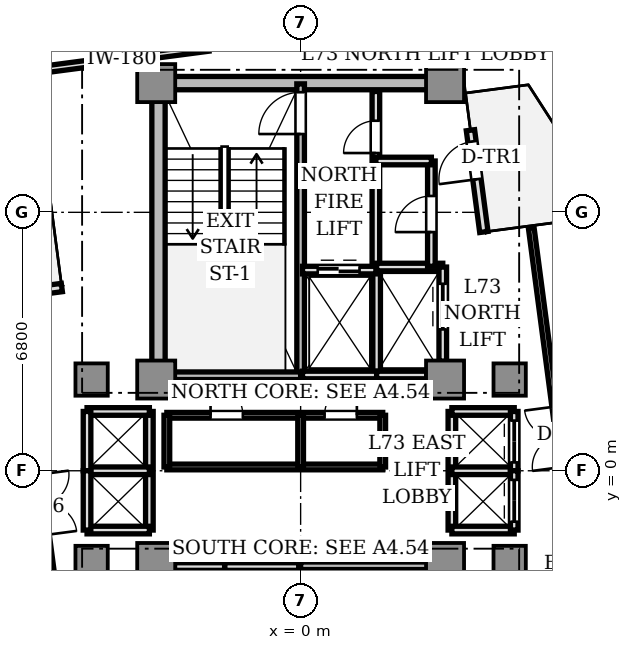
"""IFC4 building model, lengths in metres.
Left out: names, types, materials, properties, quantities, classifications, styles, units other than length and angle.
Written with IfcOpenShell. Run it as: python <this file> out.ifc"""

import sys

from ifc_helpers import new_model, si_unit, direction, frame, frame_2d, origin, origin_2d, place, context, subcontext, project, spatial, rectangle, extrude, source, transform, mapped, element, fill, save


model = new_model("IFC4")
c1 = context("Model", 3, precision=1e-05, world=origin(), true_north=direction((0.0, 1.0)))
c2 = subcontext(c1, "Body", "Model", "MODEL_VIEW")
j1 = project(units=[si_unit("LENGTHUNIT", "METRE"), si_unit("PLANEANGLEUNIT", "RADIAN")], contexts=[c1])
p1 = place(None, origin())
s1 = spatial("IfcSite", under=j1, at=p1, CompositionType="ELEMENT")
p2 = place(p1, origin())
s2 = spatial("IfcBuilding", under=s1, at=p2, CompositionType="ELEMENT")
p3 = place(p2, frame((0.0, 0.0, 261.25)))
s3 = spatial("IfcBuildingStorey", under=s2, at=p3, CompositionType="ELEMENT", Elevation=261.25)
p4 = place(p3, frame((-3.55, 10.2, 0.0), z_axis=(0.0, 0.0, 1.0), x_axis=(1.0, 0.0, 0.0)))
e1 = element("IfcWall", 1, at=p4, inside=s3, PredefinedType="SHEAR", context=c2, shape_type="SweptSolid", body=[
    extrude(rectangle(XDim=7.1, YDim=0.35, at=frame_2d((3.55, 0.0))), origin(), (0.0, 0.0, 1.0), 3.03),
])
p5 = place(p3, frame((-3.74, 2.85, 0.0), z_axis=(0.0, 0.0, 1.0), x_axis=(0.0, 1.0, 0.0)))
e2 = element("IfcWall", 2, at=p5, inside=s3, PredefinedType="SHEAR", context=c2, shape_type="SweptSolid", body=[
    extrude(rectangle(XDim=6.9, YDim=0.35, at=frame_2d((3.45, 0.0))), origin(), (0.0, 0.0, 1.0), 3.03),
])
m1 = source(origin(), c2, "Body", "SweptSolid", [
    extrude(rectangle(XDim=1.0, YDim=1.0, at=origin_2d()), origin(), (0.0, 0.0, 1.0), 3.03),
])
for number, where, z_axis, x_axis in (
    (3, (-3.8, 2.4, 0.0), (0.0, 0.0, 1.0), (1.0, 0.0, 0.0)),
    (4, (3.8, 2.4, 0.0), (0.0, 0.0, 1.0), (1.0, 0.0, 0.0)),
    (5, (-3.8, 10.2, 0.0), (0.0, 0.0, 1.0), (1.0, 0.0, 0.0)),
    (6, (3.8, 10.2, 0.0), (0.0, 0.0, 1.0), (1.0, 0.0, 0.0)),
    (7, (-3.8, -2.4, 0.0), (0.0, 0.0, 1.0), (1.0, 0.0, 0.0)),
    (8, (3.8, -2.4, 0.0), (0.0, 0.0, 1.0), (1.0, 0.0, 0.0)),
):
    element("IfcColumn", number, at=place(p3, frame(where, z_axis=z_axis, x_axis=x_axis)), inside=s3, PredefinedType="COLUMN", context=c2, shape_type="MappedRepresentation", body=[
        mapped(m1, transform((0.0, 0.0, 0.0), scale=1.0)),
    ])
m2 = source(origin(), c2, "Body", "SweptSolid", [
    extrude(rectangle(XDim=0.85, YDim=0.85, at=origin_2d()), origin(), (0.0, 0.0, 1.0), 3.03),
])
for number, where, z_axis, x_axis in (
    (9, (5.5, 2.4, 0.0), (0.0, 0.0, 1.0), (1.0, 0.0, 0.0)),
    (10, (-5.5, 2.4, 0.0), (0.0, 0.0, 1.0), (1.0, 0.0, 0.0)),
    (11, (5.5, -2.4, 0.0), (0.0, 0.0, 1.0), (1.0, 0.0, 0.0)),
    (12, (-5.5, -2.4, 0.0), (0.0, 0.0, 1.0), (1.0, 0.0, 0.0)),
):
    element("IfcColumn", number, at=place(p3, frame(where, z_axis=z_axis, x_axis=x_axis)), inside=s3, PredefinedType="COLUMN", context=c2, shape_type="MappedRepresentation", body=[
        mapped(m2, transform((0.0, 0.0, 0.0), scale=1.0)),
    ])
p6 = place(p3, frame((4.821, 6.283, 0.0), z_axis=(0.0, 0.0, 1.0), x_axis=(-0.130475563272, 0.991451525486, 0.0)))
e13 = element("IfcWall", 13, at=p6, inside=s3, PredefinedType="STANDARD", context=c2, shape_type="SweptSolid", body=[
    extrude(rectangle(XDim=2.7, YDim=0.22, at=frame_2d((1.35, 0.0))), origin(), (0.0, 0.0, 1.0), 3.03),
])
p7 = place(p6, frame((1.4, 0.0, 0.0)))
e14 = element("IfcOpeningElement", 14, at=p7, cuts=e13, PredefinedType="OPENING", context=c2, shape_type="SweptSolid", body=[
    extrude(rectangle(XDim=1.0, YDim=2.2, at=frame_2d((0.5, 1.1))), frame((0.0, 0.12, 0.0), z_axis=(0.0, -1.0, 0.0), x_axis=(1.0, 0.0, 0.0)), (0.0, 0.0, 1.0), 0.24),
])
p8 = place(p3, frame((-6.283, 4.821, 0.0), z_axis=(0.0, 0.0, 1.0), x_axis=(-0.991451525486, -0.130475563272, 0.0)))
e15 = element("IfcWall", 15, at=p8, inside=s3, PredefinedType="STANDARD", context=c2, shape_type="SweptSolid", body=[
    extrude(rectangle(XDim=2.7, YDim=0.22, at=frame_2d((1.35, 0.0))), origin(), (0.0, 0.0, 1.0), 3.03),
])
p9 = place(p8, frame((1.4, 0.0, 0.0)))
e16 = element("IfcOpeningElement", 16, at=p9, cuts=e15, PredefinedType="OPENING", context=c2, shape_type="SweptSolid", body=[
    extrude(rectangle(XDim=1.0, YDim=2.2, at=frame_2d((0.5, 1.1))), frame((0.0, 0.12, 0.0), z_axis=(0.0, -1.0, 0.0), x_axis=(1.0, 0.0, 0.0)), (0.0, 0.0, 1.0), 0.24),
])
p10 = place(p3, frame((0.0, 2.5, 0.0), z_axis=(0.0, 0.0, 1.0), x_axis=(0.0, 1.0, 0.0)))
e17 = element("IfcWall", 17, at=p10, inside=s3, PredefinedType="SOLIDWALL", context=c2, shape_type="SweptSolid", body=[
    extrude(rectangle(XDim=7.68, YDim=0.2, at=frame_2d((3.84, 0.0))), origin(), (0.0, 0.0, 1.0), 3.03),
])
p11 = place(p10, frame((6.36, 0.0, 0.0)))
e18 = element("IfcOpeningElement", 18, at=p11, cuts=e17, PredefinedType="OPENING", context=c2, shape_type="SweptSolid", body=[
    extrude(rectangle(XDim=1.1, YDim=2.15, at=frame_2d((0.55, 1.075))), frame((0.0, 0.11, 0.0), z_axis=(0.0, -1.0, 0.0), x_axis=(1.0, 0.0, 0.0)), (0.0, 0.0, 1.0), 0.22),
])
p12 = place(p3, frame((-3.72, 2.5, 0.0), z_axis=(0.0, 0.0, 1.0), x_axis=(1.0, 0.0, 0.0)))
e19 = element("IfcWall", 19, at=p12, inside=s3, PredefinedType="SOLIDWALL", context=c2, shape_type="SweptSolid", body=[
    extrude(rectangle(XDim=3.72, YDim=0.2, at=frame_2d((1.86, 0.0))), origin(), (0.0, 0.0, 1.0), 3.03),
])
p13 = place(p3, frame((0.0, -10.18, 0.0), z_axis=(0.0, 0.0, 1.0), x_axis=(0.0, 1.0, 0.0)))
e20 = element("IfcWall", 20, at=p13, inside=s3, PredefinedType="SOLIDWALL", context=c2, shape_type="SweptSolid", body=[
    extrude(rectangle(XDim=7.68, YDim=0.2, at=frame_2d((3.84, 0.0))), origin(), (0.0, 0.0, 1.0), 3.03),
])
p14 = place(p13, frame((0.28, 0.0, 0.0)))
e21 = element("IfcOpeningElement", 21, at=p14, cuts=e20, PredefinedType="OPENING", context=c2, shape_type="SweptSolid", body=[
    extrude(rectangle(XDim=1.1, YDim=2.15, at=frame_2d((0.55, 1.075))), frame((0.0, 0.11, 0.0), z_axis=(0.0, -1.0, 0.0), x_axis=(1.0, 0.0, 0.0)), (0.0, 0.0, 1.0), 0.22),
])
p15 = place(p3, frame((0.0, -2.5, 0.0), z_axis=(0.0, 0.0, 1.0), x_axis=(1.0, 0.0, 0.0)))
e22 = element("IfcWall", 22, at=p15, inside=s3, PredefinedType="SOLIDWALL", context=c2, shape_type="SweptSolid", body=[
    extrude(rectangle(XDim=3.72, YDim=0.2, at=frame_2d((1.86, 0.0))), origin(), (0.0, 0.0, 1.0), 3.03),
])
p16 = place(p3, frame((1.98, 5.32, 0.0), z_axis=(0.0, 0.0, 1.0), x_axis=(0.0, 1.0, 0.0)))
e23 = element("IfcWall", 23, at=p16, inside=s3, PredefinedType="SOLIDWALL", context=c2, shape_type="SweptSolid", body=[
    extrude(rectangle(XDim=4.66, YDim=0.2, at=frame_2d((2.33, 0.0))), origin(), (0.0, 0.0, 1.0), 2.58),
])
p17 = place(p16, frame((3.04, 0.0, 0.0)))
e24 = element("IfcOpeningElement", 24, at=p17, cuts=e23, PredefinedType="OPENING", context=c2, shape_type="SweptSolid", body=[
    extrude(rectangle(XDim=0.85, YDim=2.1, at=frame_2d((0.425, 1.05))), frame((0.0, 0.11, 0.0), z_axis=(0.0, -1.0, 0.0), x_axis=(1.0, 0.0, 0.0)), (0.0, 0.0, 1.0), 0.22),
])
p18 = place(p3, frame((2.0, 2.5, 0.0), z_axis=(0.0, 0.0, 1.0), x_axis=(0.0, 1.0, 0.0)))
e25 = element("IfcWall", 25, at=p18, inside=s3, PredefinedType="SOLIDWALL", context=c2, shape_type="SweptSolid", body=[
    extrude(rectangle(XDim=2.78, YDim=0.2, at=frame_2d((1.39, 0.0))), origin(), (0.0, 0.0, 1.0), 2.58),
])
p19 = place(p3, frame((0.05, 2.52, 0.0), z_axis=(0.0, 0.0, 1.0), x_axis=(1.0, 0.0, 0.0)))
e26 = element("IfcWall", 26, at=p19, inside=s3, PredefinedType="SOLIDWALL", context=c2, shape_type="SweptSolid", body=[
    extrude(rectangle(XDim=1.95, YDim=0.2, at=frame_2d((0.975, 0.0))), origin(), (0.0, 0.0, 1.0), 2.58),
])
p20 = place(p3, frame((0.05, 5.28, 0.0), z_axis=(0.0, 0.0, 1.0), x_axis=(1.0, 0.0, 0.0)))
e27 = element("IfcWall", 27, at=p20, inside=s3, PredefinedType="SOLIDWALL", context=c2, shape_type="SweptSolid", body=[
    extrude(rectangle(XDim=1.93, YDim=0.2, at=frame_2d((0.965, 0.0))), origin(), (0.0, 0.0, 1.0), 2.58),
])
p21 = place(p20, frame((0.4, 0.0, 0.0)))
e28 = element("IfcOpeningElement", 28, at=p21, cuts=e27, PredefinedType="OPENING", context=c2, shape_type="SweptSolid", body=[
    extrude(rectangle(XDim=1.1, YDim=2.2, at=frame_2d((0.55, 1.1))), frame((0.0, 0.11, 0.0), z_axis=(0.0, -1.0, 0.0), x_axis=(1.0, 0.0, 0.0)), (0.0, 0.0, 1.0), 0.22),
])
p22 = place(p3, frame((-2.0, -5.28, 0.0), z_axis=(0.0, 0.0, 1.0), x_axis=(0.0, 1.0, 0.0)))
e29 = element("IfcWall", 29, at=p22, inside=s3, PredefinedType="SOLIDWALL", context=c2, shape_type="SweptSolid", body=[
    extrude(rectangle(XDim=2.78, YDim=0.2, at=frame_2d((1.39, 0.0))), origin(), (0.0, 0.0, 1.0), 2.58),
])
p23 = place(p3, frame((-2.0, -2.52, 0.0), z_axis=(0.0, 0.0, 1.0), x_axis=(1.0, 0.0, 0.0)))
e30 = element("IfcWall", 30, at=p23, inside=s3, PredefinedType="SOLIDWALL", context=c2, shape_type="SweptSolid", body=[
    extrude(rectangle(XDim=1.95, YDim=0.2, at=frame_2d((0.975, 0.0))), origin(), (0.0, 0.0, 1.0), 2.58),
])
p24 = place(p3, frame((2.0, 2.52, 0.0), z_axis=(0.0, 0.0, 1.0), x_axis=(1.0, 0.0, 0.0)))
e31 = element("IfcWall", 31, at=p24, inside=s3, PredefinedType="SOLIDWALL", context=c2, shape_type="SweptSolid", body=[
    extrude(rectangle(XDim=1.32, YDim=0.2, at=frame_2d((0.66, 0.0))), origin(), (0.0, 0.0, 1.0), 2.58),
])
p25 = place(p3, frame((2.0, 5.36, 0.0), z_axis=(0.0, 0.0, 1.0), x_axis=(1.0, 0.0, 0.0)))
e32 = element("IfcWall", 32, at=p25, inside=s3, PredefinedType="SOLIDWALL", context=c2, shape_type="SweptSolid", body=[
    extrude(rectangle(XDim=1.74, YDim=0.2, at=frame_2d((0.87, 0.0))), origin(), (0.0, 0.0, 1.0), 2.58),
])
p26 = place(p3, frame((3.74, 2.88, 0.0), z_axis=(0.0, 0.0, 1.0), x_axis=(0.0, 1.0, 0.0)))
e33 = element("IfcWall", 33, at=p26, inside=s3, PredefinedType="SOLIDWALL", context=c2, shape_type="SweptSolid", body=[
    extrude(rectangle(XDim=2.48, YDim=0.2, at=frame_2d((1.24, 0.0))), origin(), (0.0, 0.0, 1.0), 2.58),
])
p27 = place(p26, frame((0.84, 0.0, 0.0)))
e34 = element("IfcOpeningElement", 34, at=p27, cuts=e33, PredefinedType="OPENING", context=c2, shape_type="SweptSolid", body=[
    extrude(rectangle(XDim=1.2, YDim=2.2, at=frame_2d((0.6, 1.1))), frame((0.0, 0.11, 0.0), z_axis=(0.0, -1.0, 0.0), x_axis=(1.0, 0.0, 0.0)), (0.0, 0.0, 1.0), 0.22),
])
p28 = place(p3, frame((-3.32, -2.52, 0.0), z_axis=(0.0, 0.0, 1.0), x_axis=(1.0, 0.0, 0.0)))
e35 = element("IfcWall", 35, at=p28, inside=s3, PredefinedType="SOLIDWALL", context=c2, shape_type="SweptSolid", body=[
    extrude(rectangle(XDim=1.32, YDim=0.2, at=frame_2d((0.66, 0.0))), origin(), (0.0, 0.0, 1.0), 2.58),
])
p29 = place(p3, frame((3.98, -1.56, 0.0), z_axis=(0.0, 0.0, 1.0), x_axis=(0.0, 1.0, 0.0)))
e36 = element("IfcWall", 36, at=p29, inside=s3, PredefinedType="SOLIDWALL", context=c2, shape_type="SweptSolid", body=[
    extrude(rectangle(XDim=3.12, YDim=0.2, at=frame_2d((1.56, 0.0))), origin(), (0.0, 0.0, 1.0), 2.25),
])
for number, where, z_axis, x_axis in (
    (37, (3.98, 1.56, 0.0), (0.0, 0.0, 1.0), (1.0, 0.0, 0.0)),
    (38, (3.98, -1.56, 0.0), (0.0, 0.0, 1.0), (1.0, 0.0, 0.0)),
    (39, (3.98, 0.0, 0.0), (0.0, 0.0, 1.0), (1.0, 0.0, 0.0)),
):
    element("IfcWall", number, at=place(p3, frame(where, z_axis=z_axis, x_axis=x_axis)), inside=s3, PredefinedType="SOLIDWALL", context=c2, shape_type="SweptSolid", body=[
        extrude(rectangle(XDim=1.64, YDim=0.2, at=frame_2d((0.82, 0.0))), origin(), (0.0, 0.0, 1.0), 2.58),
    ])
p30 = place(p3, frame((5.62, 0.0, 0.0), z_axis=(0.0, 0.0, 1.0), x_axis=(0.0, 1.0, 0.0)))
e40 = element("IfcWall", 40, at=p30, inside=s3, PredefinedType="SOLIDWALL", context=c2, shape_type="SweptSolid", body=[
    extrude(rectangle(XDim=1.56, YDim=0.2, at=frame_2d((0.78, 0.0))), origin(), (0.0, 0.0, 1.0), 2.58),
])
p31 = place(p30, frame((0.22, 0.0, 0.0)))
e41 = element("IfcOpeningElement", 41, at=p31, cuts=e40, PredefinedType="OPENING", context=c2, shape_type="SweptSolid", body=[
    extrude(rectangle(XDim=1.1, YDim=2.2, at=frame_2d((0.55, 1.1))), frame((0.0, 0.11, 0.0), z_axis=(0.0, -1.0, 0.0), x_axis=(1.0, 0.0, 0.0)), (0.0, 0.0, 1.0), 0.22),
])
p32 = place(p3, frame((5.62, -1.56, 0.0), z_axis=(0.0, 0.0, 1.0), x_axis=(0.0, 1.0, 0.0)))
e42 = element("IfcWall", 42, at=p32, inside=s3, PredefinedType="SOLIDWALL", context=c2, shape_type="SweptSolid", body=[
    extrude(rectangle(XDim=1.56, YDim=0.2, at=frame_2d((0.78, 0.0))), origin(), (0.0, 0.0, 1.0), 2.58),
])
p33 = place(p32, frame((0.22, 0.0, 0.0)))
e43 = element("IfcOpeningElement", 43, at=p33, cuts=e42, PredefinedType="OPENING", context=c2, shape_type="SweptSolid", body=[
    extrude(rectangle(XDim=1.1, YDim=2.2, at=frame_2d((0.55, 1.1))), frame((0.0, 0.11, 0.0), z_axis=(0.0, -1.0, 0.0), x_axis=(1.0, 0.0, 0.0)), (0.0, 0.0, 1.0), 0.22),
])
p34 = place(p3, frame((-3.98, -1.56, 0.0), z_axis=(0.0, 0.0, 1.0), x_axis=(0.0, 1.0, 0.0)))
e44 = element("IfcWall", 44, at=p34, inside=s3, PredefinedType="SOLIDWALL", context=c2, shape_type="SweptSolid", body=[
    extrude(rectangle(XDim=3.12, YDim=0.2, at=frame_2d((1.56, 0.0))), origin(), (0.0, 0.0, 1.0), 2.25),
])
for number, where, z_axis, x_axis in (
    (45, (-5.62, 1.56, 0.0), (0.0, 0.0, 1.0), (1.0, 0.0, 0.0)),
    (46, (-5.62, -1.56, 0.0), (0.0, 0.0, 1.0), (1.0, 0.0, 0.0)),
    (47, (-5.62, 0.0, 0.0), (0.0, 0.0, 1.0), (1.0, 0.0, 0.0)),
):
    element("IfcWall", number, at=place(p3, frame(where, z_axis=z_axis, x_axis=x_axis)), inside=s3, PredefinedType="SOLIDWALL", context=c2, shape_type="SweptSolid", body=[
        extrude(rectangle(XDim=1.64, YDim=0.2, at=frame_2d((0.82, 0.0))), origin(), (0.0, 0.0, 1.0), 2.58),
    ])
for number, where, z_axis, x_axis in (
    (48, (-5.62, 0.0, 0.0), (0.0, 0.0, 1.0), (0.0, 1.0, 0.0)),
    (49, (-5.62, -1.56, 0.0), (0.0, 0.0, 1.0), (0.0, 1.0, 0.0)),
):
    element("IfcWall", number, at=place(p3, frame(where, z_axis=z_axis, x_axis=x_axis)), inside=s3, PredefinedType="SOLIDWALL", context=c2, shape_type="SweptSolid", body=[
        extrude(rectangle(XDim=1.56, YDim=0.2, at=frame_2d((0.78, 0.0))), origin(), (0.0, 0.0, 1.0), 2.58),
    ])
p35 = place(p3, frame((3.44, 5.38, 0.0), z_axis=(0.0, 0.0, 1.0), x_axis=(0.0, 1.0, 0.0)))
e50 = element("IfcWall", 50, at=p35, inside=s3, PredefinedType="SOLIDWALL", context=c2, shape_type="SweptSolid", body=[
    extrude(rectangle(XDim=2.77, YDim=0.2, at=frame_2d((1.385, 0.0))), origin(), (0.0, 0.0, 1.0), 2.58),
])
p36 = place(p35, frame((0.9, 0.0, 0.0)))
e51 = element("IfcOpeningElement", 51, at=p36, cuts=e50, PredefinedType="OPENING", context=c2, shape_type="SweptSolid", body=[
    extrude(rectangle(XDim=0.95, YDim=2.15, at=frame_2d((0.475, 1.075))), frame((0.0, 0.11, 0.0), z_axis=(0.0, -1.0, 0.0), x_axis=(1.0, 0.0, 0.0)), (0.0, 0.0, 1.0), 0.22),
])
p37 = place(p3, frame((1.98, 8.15, 0.0), z_axis=(0.0, 0.0, 1.0), x_axis=(1.0, 0.0, 0.0)))
e52 = element("IfcWall", 52, at=p37, inside=s3, PredefinedType="SOLIDWALL", context=c2, shape_type="SweptSolid", body=[
    extrude(rectangle(XDim=1.46, YDim=0.2, at=frame_2d((0.73, 0.0))), origin(), (0.0, 0.0, 1.0), 2.58),
])
p38 = place(p3, frame((-3.52, 0.1, 0.0), z_axis=(0.0, 0.0, 1.0), x_axis=(1.0, 0.0, 0.0)))
e53 = element("IfcWall", 53, at=p38, inside=s3, PredefinedType="PARTITIONING", context=c2, shape_type="SweptSolid", body=[
    extrude(rectangle(XDim=5.68, YDim=0.15, at=frame_2d((2.84, 0.0))), origin(), (0.0, 0.0, 1.0), 2.58),
])
p39 = place(p3, frame((-3.52, 1.46, 0.0), z_axis=(0.0, 0.0, 1.0), x_axis=(1.0, 0.0, 0.0)))
e54 = element("IfcWall", 54, at=p39, inside=s3, PredefinedType="PARTITIONING", context=c2, shape_type="SweptSolid", body=[
    extrude(rectangle(XDim=5.68, YDim=0.15, at=frame_2d((2.84, 0.0))), origin(), (0.0, 0.0, 1.0), 2.58),
])
p40 = place(p39, frame((1.15, 0.0, 0.0)))
e55 = element("IfcOpeningElement", 55, at=p40, cuts=e54, PredefinedType="OPENING", context=c2, shape_type="SweptSolid", body=[
    extrude(rectangle(XDim=0.85, YDim=2.1, at=frame_2d((0.425, 1.05))), frame((0.0, 0.085, 0.0), z_axis=(0.0, -1.0, 0.0), x_axis=(1.0, 0.0, 0.0)), (0.0, 0.0, 1.0), 0.17),
])
p41 = place(p39, frame((4.15, 0.0, 0.0)))
e56 = element("IfcOpeningElement", 56, at=p41, cuts=e54, PredefinedType="OPENING", context=c2, shape_type="SweptSolid", body=[
    extrude(rectangle(XDim=0.85, YDim=2.1, at=frame_2d((0.425, 1.05))), frame((0.0, 0.085, 0.0), z_axis=(0.0, -1.0, 0.0), x_axis=(1.0, 0.0, 0.0)), (0.0, 0.0, 1.0), 0.17),
])
p42 = place(p3, frame((-3.52, 0.1, 0.0), z_axis=(0.0, 0.0, 1.0), x_axis=(0.0, 1.0, 0.0)))
e57 = element("IfcWall", 57, at=p42, inside=s3, PredefinedType="PARTITIONING", context=c2, shape_type="SweptSolid", body=[
    extrude(rectangle(XDim=1.36, YDim=0.15, at=frame_2d((0.68, 0.0))), origin(), (0.0, 0.0, 1.0), 2.25),
])
for number, where, z_axis, x_axis in (
    (58, (2.16, 0.1, 0.0), (0.0, 0.0, 1.0), (0.0, 1.0, 0.0)),
    (59, (0.0, 0.1, 0.0), (0.0, 0.0, 1.0), (0.0, 1.0, 0.0)),
):
    element("IfcWall", number, at=place(p3, frame(where, z_axis=z_axis, x_axis=x_axis)), inside=s3, PredefinedType="PARTITIONING", context=c2, shape_type="SweptSolid", body=[
        extrude(rectangle(XDim=1.36, YDim=0.15, at=frame_2d((0.68, 0.0))), origin(), (0.0, 0.0, 1.0), 2.58),
    ])
p43 = place(p3, frame((7.516, -4.608, 0.0), z_axis=(0.0, 0.0, 1.0), x_axis=(-0.130539856574, 0.991443062332, 0.0)))
e60 = element("IfcWall", 60, at=p43, inside=s3, PredefinedType="PARTITIONING", context=c2, shape_type="SweptSolid", body=[
    extrude(rectangle(XDim=11.1, YDim=0.15, at=frame_2d((5.55, 0.0))), origin(), (0.0, 0.0, 1.0), 2.58),
])
p44 = place(p43, frame((4.75, 0.0, 0.0)))
e61 = element("IfcOpeningElement", 61, at=p44, cuts=e60, PredefinedType="OPENING", context=c2, shape_type="SweptSolid", body=[
    extrude(rectangle(XDim=1.6, YDim=2.25, at=frame_2d((0.8, 1.125))), frame((0.0, 0.085, 0.0), z_axis=(0.0, -1.0, 0.0), x_axis=(1.0, 0.0, 0.0)), (0.0, 0.0, 1.0), 0.17),
])
p45 = place(p3, frame((-2.423, 11.129, 0.0), z_axis=(0.0, 0.0, 1.0), x_axis=(-0.991446706518, -0.130512176195, 0.0)))
e62 = element("IfcWall", 62, at=p45, inside=s3, PredefinedType="PARTITIONING", context=c2, shape_type="SweptSolid", body=[
    extrude(rectangle(XDim=4.6, YDim=0.18, at=frame_2d((2.3, 0.0))), origin(), (0.0, 0.0, 1.0), 2.58),
])
p46 = place(p3, frame((-7.516, 4.608, 0.0), z_axis=(0.0, 0.0, 1.0), x_axis=(0.130539856574, -0.991443062332, 0.0)))
e63 = element("IfcWall", 63, at=p46, inside=s3, PredefinedType="PARTITIONING", context=c2, shape_type="SweptSolid", body=[
    extrude(rectangle(XDim=11.1, YDim=0.15, at=frame_2d((5.55, 0.0))), origin(), (0.0, 0.0, 1.0), 2.58),
])
p47 = place(p46, frame((4.75, 0.0, 0.0)))
e64 = element("IfcOpeningElement", 64, at=p47, cuts=e63, PredefinedType="OPENING", context=c2, shape_type="SweptSolid", body=[
    extrude(rectangle(XDim=1.6, YDim=2.25, at=frame_2d((0.8, 1.125))), frame((0.0, 0.085, 0.0), z_axis=(0.0, -1.0, 0.0), x_axis=(1.0, 0.0, 0.0)), (0.0, 0.0, 1.0), 0.17),
])
m3 = source(origin(), c2, "Body", "SweptSolid", [
    extrude(rectangle(XDim=1.0, YDim=0.05, at=origin_2d()), origin(), (0.0, 0.0, 1.0), 2.2),
])
p48 = place(p7, frame((0.5, 0.0, 0.0)))
e65 = element("IfcDoor", 65, at=p48, inside=s3, OperationType="SINGLE_SWING_LEFT", PredefinedType="DOOR", context=c2, shape_type="MappedRepresentation", body=[
    mapped(m3, transform((0.0, 0.0, 0.0), scale=1.0)),
])
fill(e14, e65)
m4 = source(origin(), c2, "Body", "SweptSolid", [
    extrude(rectangle(XDim=1.1, YDim=0.05, at=origin_2d()), origin(), (0.0, 0.0, 1.0), 2.15),
])
p49 = place(p11, frame((0.55, 0.0, 0.0)))
e66 = element("IfcDoor", 66, at=p49, inside=s3, OperationType="SINGLE_SWING_LEFT", PredefinedType="DOOR", context=c2, shape_type="MappedRepresentation", body=[
    mapped(m4, transform((0.0, 0.0, 0.0), scale=1.0)),
])
fill(e18, e66)
m5 = source(origin(), c2, "Body", "SweptSolid", [
    extrude(rectangle(XDim=0.85, YDim=0.05, at=origin_2d()), origin(), (0.0, 0.0, 1.0), 2.1),
])
p50 = place(p17, frame((0.425, 0.0, 0.0)))
e67 = element("IfcDoor", 67, at=p50, inside=s3, OperationType="SINGLE_SWING_LEFT", PredefinedType="DOOR", context=c2, shape_type="MappedRepresentation", body=[
    mapped(m5, transform((0.0, 0.0, 0.0), scale=1.0)),
])
fill(e24, e67)
m6 = source(origin(), c2, "Body", "SweptSolid", [
    extrude(rectangle(XDim=1.1, YDim=0.05, at=origin_2d()), origin(), (0.0, 0.0, 1.0), 2.2),
])
p51 = place(p21, frame((0.55, 0.0, 0.0)))
e68 = element("IfcDoor", 68, at=p51, inside=s3, OperationType="DOUBLE_DOOR_SLIDING", PredefinedType="DOOR", context=c2, shape_type="MappedRepresentation", body=[
    mapped(m6, transform((0.0, 0.0, 0.0), scale=1.0)),
])
fill(e28, e68)
m7 = source(origin(), c2, "Body", "SweptSolid", [
    extrude(rectangle(XDim=1.2, YDim=0.05, at=origin_2d()), origin(), (0.0, 0.0, 1.0), 2.2),
])
p52 = place(p27, frame((0.6, 0.0, 0.0)))
e69 = element("IfcDoor", 69, at=p52, inside=s3, OperationType="DOUBLE_DOOR_SLIDING", PredefinedType="DOOR", context=c2, shape_type="MappedRepresentation", body=[
    mapped(m7, transform((0.0, 0.0, 0.0), scale=1.0)),
])
fill(e34, e69)
p53 = place(p31, frame((0.55, 0.0, 0.0)))
e70 = element("IfcDoor", 70, at=p53, inside=s3, OperationType="DOUBLE_DOOR_SLIDING", PredefinedType="DOOR", context=c2, shape_type="MappedRepresentation", body=[
    mapped(m6, transform((0.0, 0.0, 0.0), scale=1.0)),
])
fill(e41, e70)
p54 = place(p33, frame((0.55, 0.0, 0.0)))
e71 = element("IfcDoor", 71, at=p54, inside=s3, OperationType="DOUBLE_DOOR_SLIDING", PredefinedType="DOOR", context=c2, shape_type="MappedRepresentation", body=[
    mapped(m6, transform((0.0, 0.0, 0.0), scale=1.0)),
])
fill(e43, e71)
m8 = source(origin(), c2, "Body", "SweptSolid", [
    extrude(rectangle(XDim=0.95, YDim=0.05, at=origin_2d()), origin(), (0.0, 0.0, 1.0), 2.15),
])
p55 = place(p36, frame((0.475, 0.0, 0.0)))
e72 = element("IfcDoor", 72, at=p55, inside=s3, OperationType="SINGLE_SWING_LEFT", PredefinedType="DOOR", context=c2, shape_type="MappedRepresentation", body=[
    mapped(m8, transform((0.0, 0.0, 0.0), scale=1.0)),
])
fill(e51, e72)
p56 = place(p40, frame((0.425, 0.0, 0.0)))
e73 = element("IfcDoor", 73, at=p56, inside=s3, OperationType="SINGLE_SWING_LEFT", PredefinedType="DOOR", context=c2, shape_type="MappedRepresentation", body=[
    mapped(m5, transform((0.0, 0.0, 0.0), scale=1.0)),
])
fill(e55, e73)
p57 = place(p41, frame((0.425, 0.0, 0.0)))
e74 = element("IfcDoor", 74, at=p57, inside=s3, OperationType="SINGLE_SWING_RIGHT", PredefinedType="DOOR", context=c2, shape_type="MappedRepresentation", body=[
    mapped(m5, transform((0.0, 0.0, 0.0), scale=1.0)),
])
fill(e56, e74)
save(model, sys.argv[1])
